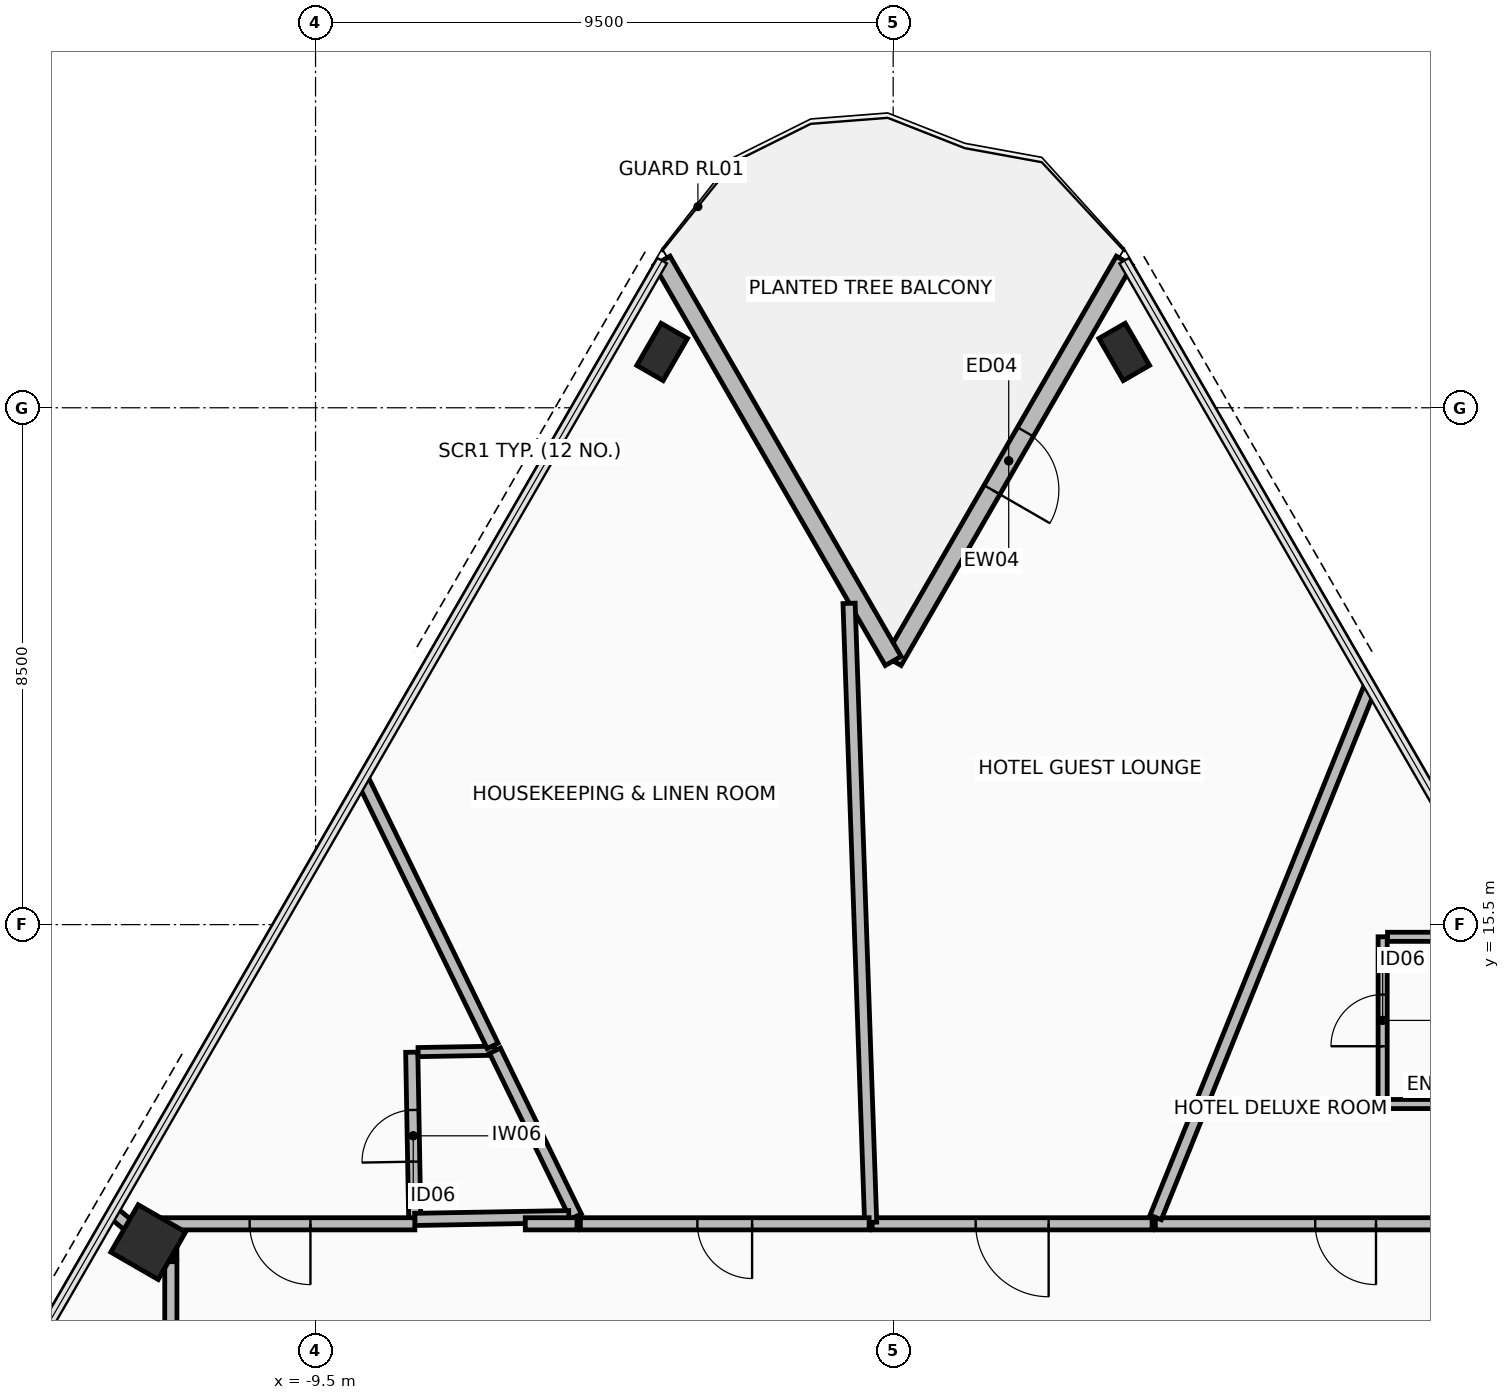
"""IFC4 building model, lengths in metres.
Left out: names, types, materials, properties, quantities, classifications, styles, units other than length and angle.
Written with IfcOpenShell. Run it as: python <this file> out.ifc"""

import sys

from ifc_helpers import new_model, si_unit, direction, frame, frame_2d, origin, origin_2d, place, context, subcontext, project, spatial, rectangle, hollow_rectangle, extrude, element, fill, save


model = new_model("IFC4")
c1 = context("Model", 3, precision=1e-05, world=origin(), true_north=direction((0.0, 1.0)))
c2 = subcontext(c1, "Body", "Model", "MODEL_VIEW")
j1 = project(units=[si_unit("LENGTHUNIT", "METRE"), si_unit("PLANEANGLEUNIT", "RADIAN")], contexts=[c1])
p1 = place(None, origin())
s1 = spatial("IfcSite", under=j1, at=p1, CompositionType="ELEMENT")
p2 = place(p1, origin())
s2 = spatial("IfcBuilding", under=s1, at=p2, CompositionType="ELEMENT")
p3 = place(p2, frame((0.0, 0.0, 42.05)))
s3 = spatial("IfcBuildingStorey", under=s2, at=p3, CompositionType="ELEMENT", Elevation=42.05)
p4 = place(p3, frame((-3.8, 24.918, 0.0), z_axis=(0.0, 0.0, 1.0), x_axis=(0.500001511499, 0.866024531118, 0.0)))
e1 = element("IfcColumn", 1, at=p4, inside=s3, PredefinedType="COLUMN", context=c2, shape_type="SweptSolid", body=[
    extrude(hollow_rectangle(XDim=0.5, YDim=0.8, WallThickness=0.04, at=origin_2d()), origin(), (0.0, 0.0, 1.0), 3.4),
])
p5 = place(p3, frame((-12.252, 10.279, 0.0), z_axis=(0.0, 0.0, 1.0), x_axis=(0.500001511499, 0.866024531118, 0.0)))
e2 = element("IfcColumn", 2, at=p5, inside=s3, PredefinedType="COLUMN", context=c2, shape_type="SweptSolid", body=[
    extrude(hollow_rectangle(XDim=0.9, YDim=0.9, WallThickness=0.05, at=origin_2d()), origin(), (0.0, 0.0, 1.0), 3.4),
])
p6 = place(p3, frame((3.8, 24.918, 0.0), z_axis=(0.0, 0.0, 1.0), x_axis=(-0.500001511499, 0.866024531118, 0.0)))
e3 = element("IfcColumn", 3, at=p6, inside=s3, PredefinedType="COLUMN", context=c2, shape_type="SweptSolid", body=[
    extrude(hollow_rectangle(XDim=0.5, YDim=0.8, WallThickness=0.04, at=origin_2d()), origin(), (0.0, 0.0, 1.0), 3.4),
])
p7 = place(p3, frame((3.8, 26.418, 0.0), z_axis=(0.0, 0.0, 1.0), x_axis=(-0.500005158081, -0.866022425744, 0.0)))
e4 = element("IfcWall", 4, at=p7, inside=s3, PredefinedType="STANDARD", context=c2, shape_type="SweptSolid", body=[
    extrude(rectangle(XDim=7.6, YDim=0.3, at=frame_2d((3.8, 0.0))), origin(), (0.0, 0.0, 1.0), 2.42),
])
p8 = place(p7, frame((3.25, 0.0, 0.0)))
e5 = element("IfcOpeningElement", 5, at=p8, cuts=e4, PredefinedType="OPENING", context=c2, shape_type="SweptSolid", body=[
    extrude(rectangle(XDim=1.1, YDim=2.2, at=frame_2d((0.55, 1.1))), frame((0.0, 0.16, 0.0), z_axis=(0.0, -1.0, 0.0), x_axis=(1.0, 0.0, 0.0)), (0.0, 0.0, 1.0), 0.32),
])
p9 = place(p3, frame((0.0, 19.836, 0.0), z_axis=(0.0, 0.0, 1.0), x_axis=(-0.500005158081, 0.866022425744, 0.0)))
e6 = element("IfcWall", 6, at=p9, inside=s3, PredefinedType="STANDARD", context=c2, shape_type="SweptSolid", body=[
    extrude(rectangle(XDim=7.6, YDim=0.3, at=frame_2d((3.8, 0.0))), origin(), (0.0, 0.0, 1.0), 2.42),
])
p10 = place(p3, frame((8.05, 12.55, 0.0), z_axis=(0.0, 0.0, 1.0), x_axis=(0.0, 1.0, 0.0)))
e7 = element("IfcWall", 7, at=p10, inside=s3, PredefinedType="PARTITIONING", context=c2, shape_type="SweptSolid", body=[
    extrude(rectangle(XDim=2.75, YDim=0.15, at=frame_2d((1.375, 0.0))), origin(), (0.0, 0.0, 1.0), 2.82),
])
p11 = place(p10, frame((0.95, 0.0, 0.0)))
e8 = element("IfcOpeningElement", 8, at=p11, cuts=e7, PredefinedType="OPENING", context=c2, shape_type="SweptSolid", body=[
    extrude(rectangle(XDim=0.85, YDim=2.1, at=frame_2d((0.425, 1.05))), frame((0.0, 0.085, 0.0), z_axis=(0.0, -1.0, 0.0), x_axis=(1.0, 0.0, 0.0)), (0.0, 0.0, 1.0), 0.17),
])
p12 = place(p3, frame((8.13, 15.3, 0.0), z_axis=(0.0, 0.0, 1.0), x_axis=(1.0, 0.0, 0.0)))
e9 = element("IfcWall", 9, at=p12, inside=s3, PredefinedType="PARTITIONING", context=c2, shape_type="SweptSolid", body=[
    extrude(rectangle(XDim=2.089, YDim=0.15, at=frame_2d((1.044, 0.0))), origin(), (0.0, 0.0, 1.0), 2.42),
])
p13 = place(p3, frame((10.62, 12.55, 0.0), z_axis=(0.0, 0.0, 1.0), x_axis=(-1.0, 0.0, 0.0)))
e10 = element("IfcWall", 10, at=p13, inside=s3, PredefinedType="PARTITIONING", context=c2, shape_type="SweptSolid", body=[
    extrude(rectangle(XDim=2.49, YDim=0.15, at=frame_2d((1.245, 0.0))), origin(), (0.0, 0.0, 1.0), 2.82),
])
p14 = place(p3, frame((-7.868, 10.652, 0.0), z_axis=(0.0, 0.0, 1.0), x_axis=(-0.018022289986, 0.999837585343, 0.0)))
e11 = element("IfcWall", 11, at=p14, inside=s3, PredefinedType="PARTITIONING", context=c2, shape_type="SweptSolid", body=[
    extrude(rectangle(XDim=2.75, YDim=0.2, at=frame_2d((1.375, 0.0))), origin(), (0.0, 0.0, 1.0), 2.62),
])
p15 = place(p14, frame((0.95, 0.0, 0.0)))
e12 = element("IfcOpeningElement", 12, at=p15, cuts=e11, PredefinedType="OPENING", context=c2, shape_type="SweptSolid", body=[
    extrude(rectangle(XDim=0.85, YDim=2.1, at=frame_2d((0.425, 1.05))), frame((0.0, 0.11, 0.0), z_axis=(0.0, -1.0, 0.0), x_axis=(1.0, 0.0, 0.0)), (0.0, 0.0, 1.0), 0.22),
])
p16 = place(p3, frame((-7.813, 13.404, 0.0), z_axis=(0.0, 0.0, 1.0), x_axis=(0.999838809641, 0.017954240065, 0.0)))
e13 = element("IfcWall", 13, at=p16, inside=s3, PredefinedType="PARTITIONING", context=c2, shape_type="SweptSolid", body=[
    extrude(rectangle(XDim=1.265, YDim=0.15, at=frame_2d((0.632, 0.0))), origin(), (0.0, 0.0, 1.0), 2.62),
])
p17 = place(p3, frame((-6.549, 13.427, 0.0), z_axis=(0.0, 0.0, 1.0), x_axis=(0.438371306131, -0.898793968583, 0.0)))
e14 = element("IfcWall", 14, at=p17, inside=s3, PredefinedType="PARTITIONING", context=c2, shape_type="SweptSolid", body=[
    extrude(rectangle(XDim=3.034, YDim=0.2, at=frame_2d((1.517, 0.0))), origin(), (0.0, 0.0, 1.0), 3.225),
])
p18 = place(p3, frame((-5.334, 10.698, 0.0), z_axis=(0.0, 0.0, 1.0), x_axis=(-0.999837730658, -0.018014226383, 0.0)))
e15 = element("IfcWall", 15, at=p18, inside=s3, PredefinedType="PARTITIONING", context=c2, shape_type="SweptSolid", body=[
    extrude(rectangle(XDim=2.534, YDim=0.2, at=frame_2d((1.267, 0.0))), origin(), (0.0, 0.0, 1.0), 2.62),
])
p19 = place(p3, frame((10.57, 10.58, 0.0), z_axis=(0.0, 0.0, 1.0), x_axis=(-1.0, 0.0, 0.0)))
e16 = element("IfcWall", 16, at=p19, inside=s3, PredefinedType="PARTITIONING", context=c2, shape_type="SweptSolid", body=[
    extrude(rectangle(XDim=6.258, YDim=0.2, at=frame_2d((3.129, 0.0))), origin(), (0.0, 0.0, 1.0), 2.82),
])
p20 = place(p19, frame((2.629, 0.0, 0.0)))
e17 = element("IfcOpeningElement", 17, at=p20, cuts=e16, PredefinedType="OPENING", context=c2, shape_type="SweptSolid", body=[
    extrude(rectangle(XDim=1.0, YDim=2.15, at=frame_2d((0.5, 1.075))), frame((0.0, 0.11, 0.0), z_axis=(0.0, -1.0, 0.0), x_axis=(1.0, 0.0, 0.0)), (0.0, 0.0, 1.0), 0.22),
])
p21 = place(p3, frame((4.317, 10.685, 0.0), z_axis=(0.0, 0.0, 1.0), x_axis=(0.374616543298, 0.927179834492, 0.0)))
e18 = element("IfcWall", 18, at=p21, inside=s3, PredefinedType="PARTITIONING", context=c2, shape_type="SweptSolid", body=[
    extrude(rectangle(XDim=9.415, YDim=0.2, at=frame_2d((4.707, 0.0))), origin(), (0.0, 0.0, 1.0), 2.42),
])
p22 = place(p3, frame((4.258, 10.58, 0.0), z_axis=(0.0, 0.0, 1.0), x_axis=(-1.0, 0.0, 0.0)))
e19 = element("IfcWall", 19, at=p22, inside=s3, PredefinedType="PARTITIONING", context=c2, shape_type="SweptSolid", body=[
    extrude(rectangle(XDim=4.603, YDim=0.2, at=frame_2d((2.302, 0.0))), origin(), (0.0, 0.0, 1.0), 2.57),
])
p23 = place(p22, frame((1.701, 0.0, 0.0)))
e20 = element("IfcOpeningElement", 20, at=p23, cuts=e19, PredefinedType="OPENING", context=c2, shape_type="SweptSolid", body=[
    extrude(rectangle(XDim=1.2, YDim=2.15, at=frame_2d((0.6, 1.075))), frame((0.0, 0.11, 0.0), z_axis=(0.0, -1.0, 0.0), x_axis=(1.0, 0.0, 0.0)), (0.0, 0.0, 1.0), 0.22),
])
p24 = place(p3, frame((-0.37, 10.604, 0.0), z_axis=(0.0, 0.0, 1.0), x_axis=(-0.034898982379, 0.99939084498, 0.0)))
e21 = element("IfcWall", 21, at=p24, inside=s3, PredefinedType="PARTITIONING", context=c2, shape_type="SweptSolid", body=[
    extrude(rectangle(XDim=10.186, YDim=0.2, at=frame_2d((5.093, 0.0))), origin(), (0.0, 0.0, 1.0), 3.225),
])
p25 = place(p3, frame((-0.395, 10.58, 0.0), z_axis=(0.0, 0.0, 1.0), x_axis=(-1.0, 0.0, 0.0)))
e22 = element("IfcWall", 22, at=p25, inside=s3, PredefinedType="PARTITIONING", context=c2, shape_type="SweptSolid", body=[
    extrude(rectangle(XDim=4.749, YDim=0.2, at=frame_2d((2.375, 0.0))), origin(), (0.0, 0.0, 1.0), 3.225),
])
p26 = place(p25, frame((1.925, 0.0, 0.0)))
e23 = element("IfcOpeningElement", 23, at=p26, cuts=e22, PredefinedType="OPENING", context=c2, shape_type="SweptSolid", body=[
    extrude(rectangle(XDim=0.9, YDim=2.1, at=frame_2d((0.45, 1.05))), frame((0.0, 0.11, 0.0), z_axis=(0.0, -1.0, 0.0), x_axis=(1.0, 0.0, 0.0)), (0.0, 0.0, 1.0), 0.22),
])
p27 = place(p3, frame((-6.587, 13.506, 0.0), z_axis=(0.0, 0.0, 1.0), x_axis=(-0.438355377526, 0.898801737312, 0.0)))
e24 = element("IfcWall", 24, at=p27, inside=s3, PredefinedType="PARTITIONING", context=c2, shape_type="SweptSolid", body=[
    extrude(rectangle(XDim=4.863, YDim=0.2, at=frame_2d((2.431, 0.0))), origin(), (0.0, 0.0, 1.0), 2.42),
])
p28 = place(p3, frame((-11.88, 10.579, 0.0), z_axis=(0.0, 0.0, 1.0), x_axis=(0.0, -1.0, 0.0)))
e25 = element("IfcWall", 25, at=p28, inside=s3, PredefinedType="PARTITIONING", context=c2, shape_type="SweptSolid", body=[
    extrude(rectangle(XDim=0.557, YDim=0.2, at=frame_2d((0.279, 0.0))), origin(), (0.0, 0.0, 1.0), 2.42),
])
p29 = place(p3, frame((-11.985, 10.057, 0.0), z_axis=(0.0, 0.0, 1.0), x_axis=(-0.766009766159, 0.642828933815, 0.0)))
e26 = element("IfcWall", 26, at=p29, inside=s3, PredefinedType="PARTITIONING", context=c2, shape_type="SweptSolid", body=[
    extrude(rectangle(XDim=1.088, YDim=0.2, at=frame_2d((0.544, 0.0))), origin(), (0.0, 0.0, 1.0), 2.42),
])
p30 = place(p3, frame((-5.2, 10.58, 0.0), z_axis=(0.0, 0.0, 1.0), x_axis=(-1.0, 0.0, 0.0)))
e27 = element("IfcWall", 27, at=p30, inside=s3, PredefinedType="PARTITIONING", context=c2, shape_type="SweptSolid", body=[
    extrude(rectangle(XDim=0.85, YDim=0.2, at=frame_2d((0.425, 0.0))), origin(), (0.0, 0.0, 1.0), 3.225),
])
p31 = place(p3, frame((-7.867, 10.58, 0.0), z_axis=(0.0, 0.0, 1.0), x_axis=(-1.0, 0.0, 0.0)))
e28 = element("IfcWall", 28, at=p31, inside=s3, PredefinedType="PARTITIONING", context=c2, shape_type="SweptSolid", body=[
    extrude(rectangle(XDim=4.579, YDim=0.2, at=frame_2d((2.289, 0.0))), origin(), (0.0, 0.0, 1.0), 2.42),
])
p32 = place(p31, frame((1.717, 0.0, 0.0)))
e29 = element("IfcOpeningElement", 29, at=p32, cuts=e28, PredefinedType="OPENING", context=c2, shape_type="SweptSolid", body=[
    extrude(rectangle(XDim=1.0, YDim=2.15, at=frame_2d((0.5, 1.075))), frame((0.0, 0.11, 0.0), z_axis=(0.0, -1.0, 0.0), x_axis=(1.0, 0.0, 0.0)), (0.0, 0.0, 1.0), 0.22),
])
p33 = place(p3, frame((-11.88, 9.957, 0.0), z_axis=(0.0, 0.0, 1.0), x_axis=(0.0, -1.0, 0.0)))
e30 = element("IfcWall", 30, at=p33, inside=s3, PredefinedType="PARTITIONING", context=c2, shape_type="SweptSolid", body=[
    extrude(rectangle(XDim=6.517, YDim=0.2, at=frame_2d((3.259, 0.0))), origin(), (0.0, 0.0, 1.0), 2.62),
])
p34 = place(p33, frame((2.659, 0.0, 0.0)))
e31 = element("IfcOpeningElement", 31, at=p34, cuts=e30, PredefinedType="OPENING", context=c2, shape_type="SweptSolid", body=[
    extrude(rectangle(XDim=1.2, YDim=2.15, at=frame_2d((0.6, 1.075))), frame((0.0, 0.11, 0.0), z_axis=(0.0, -1.0, 0.0), x_axis=(1.0, 0.0, 0.0)), (0.0, 0.0, 1.0), 0.22),
])
p35 = place(p8, frame((1.1, 0.0, 0.0), z_axis=(0.0, 0.0, 1.0), x_axis=(-1.0, 0.0, 0.0)))
e32 = element("IfcDoor", 32, at=p35, inside=s3, OperationType="SINGLE_SWING_LEFT", PredefinedType="DOOR", context=c2, shape_type="SweptSolid", body=[
    extrude(rectangle(XDim=1.1, YDim=2.2, at=frame_2d((0.55, 1.1))), frame((0.0, 0.025, 0.0), z_axis=(0.0, -1.0, 0.0), x_axis=(1.0, 0.0, 0.0)), (0.0, 0.0, 1.0), 0.05),
])
fill(e5, e32)
p36 = place(p11, origin())
e33 = element("IfcDoor", 33, at=p36, inside=s3, OperationType="SINGLE_SWING_RIGHT", PredefinedType="DOOR", context=c2, shape_type="SweptSolid", body=[
    extrude(rectangle(XDim=0.85, YDim=2.1, at=frame_2d((0.425, 1.05))), frame((0.0, 0.025, 0.0), z_axis=(0.0, -1.0, 0.0), x_axis=(1.0, 0.0, 0.0)), (0.0, 0.0, 1.0), 0.05),
])
fill(e8, e33)
p37 = place(p15, origin())
e34 = element("IfcDoor", 34, at=p37, inside=s3, OperationType="SINGLE_SWING_RIGHT", PredefinedType="DOOR", context=c2, shape_type="SweptSolid", body=[
    extrude(rectangle(XDim=0.85, YDim=2.1, at=frame_2d((0.425, 1.05))), frame((0.0, 0.025, 0.0), z_axis=(0.0, -1.0, 0.0), x_axis=(1.0, 0.0, 0.0)), (0.0, 0.0, 1.0), 0.05),
])
fill(e12, e34)
p38 = place(p20, origin())
e35 = element("IfcDoor", 35, at=p38, inside=s3, OperationType="SINGLE_SWING_LEFT", PredefinedType="DOOR", context=c2, shape_type="SweptSolid", body=[
    extrude(rectangle(XDim=1.0, YDim=2.15, at=frame_2d((0.5, 1.075))), frame((0.0, 0.025, 0.0), z_axis=(0.0, -1.0, 0.0), x_axis=(1.0, 0.0, 0.0)), (0.0, 0.0, 1.0), 0.05),
])
fill(e17, e35)
p39 = place(p23, origin())
e36 = element("IfcDoor", 36, at=p39, inside=s3, OperationType="SINGLE_SWING_LEFT", PredefinedType="DOOR", context=c2, shape_type="SweptSolid", body=[
    extrude(rectangle(XDim=1.2, YDim=2.15, at=frame_2d((0.6, 1.075))), frame((0.0, 0.025, 0.0), z_axis=(0.0, -1.0, 0.0), x_axis=(1.0, 0.0, 0.0)), (0.0, 0.0, 1.0), 0.05),
])
fill(e20, e36)
p40 = place(p26, origin())
e37 = element("IfcDoor", 37, at=p40, inside=s3, OperationType="SINGLE_SWING_LEFT", PredefinedType="DOOR", context=c2, shape_type="SweptSolid", body=[
    extrude(rectangle(XDim=0.9, YDim=2.1, at=frame_2d((0.45, 1.05))), frame((0.0, 0.025, 0.0), z_axis=(0.0, -1.0, 0.0), x_axis=(1.0, 0.0, 0.0)), (0.0, 0.0, 1.0), 0.05),
])
fill(e23, e37)
p41 = place(p32, origin())
e38 = element("IfcDoor", 38, at=p41, inside=s3, OperationType="SINGLE_SWING_LEFT", PredefinedType="DOOR", context=c2, shape_type="SweptSolid", body=[
    extrude(rectangle(XDim=1.0, YDim=2.15, at=frame_2d((0.5, 1.075))), frame((0.0, 0.025, 0.0), z_axis=(0.0, -1.0, 0.0), x_axis=(1.0, 0.0, 0.0)), (0.0, 0.0, 1.0), 0.05),
])
fill(e29, e38)
save(model, sys.argv[1])
